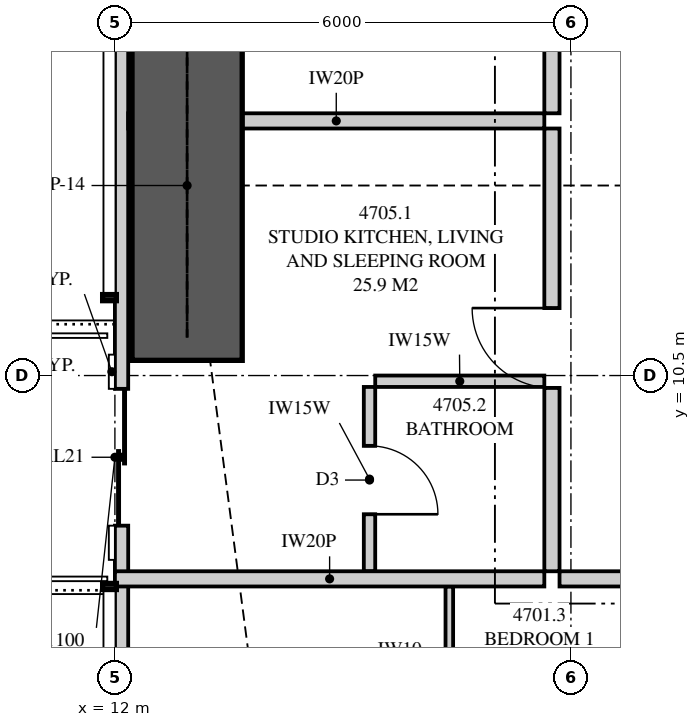
"""IFC4 building model, lengths in metres.
Left out: names, types, materials, properties, quantities, classifications, styles, units other than length and angle.
Written with IfcOpenShell. Run it as: python <this file> out.ifc"""

import sys

from ifc_helpers import new_model, si_unit, direction, frame, frame_2d, origin, place, context, subcontext, project, spatial, polyline, rectangle, outline, extrude, element, fill, save


model = new_model("IFC4")
c1 = context("Model", 3, precision=1e-05, world=origin(), true_north=direction((0.0, 1.0)))
c2 = subcontext(c1, "Body", "Model", "MODEL_VIEW")
j1 = project(units=[si_unit("LENGTHUNIT", "METRE"), si_unit("PLANEANGLEUNIT", "RADIAN")], contexts=[c1])
p1 = place(None, origin())
s1 = spatial("IfcSite", under=j1, at=p1, CompositionType="ELEMENT")
p2 = place(p1, origin())
s2 = spatial("IfcBuilding", under=s1, at=p2, CompositionType="ELEMENT")
p3 = place(p2, frame((0.0, 0.0, 174.45)))
s3 = spatial("IfcBuildingStorey", under=s2, at=p3, CompositionType="ELEMENT", Elevation=174.45)
p4 = place(p3, frame((12.087, 32.949, 0.0), z_axis=(0.0, 0.0, 1.0), x_axis=(0.0, -1.0, 0.0)))
e1 = element("IfcWall", 1, at=p4, inside=s3, PredefinedType="SOLIDWALL", context=c2, shape_type="SweptSolid", body=[
    extrude(outline(polyline([(0.0, 0.0), (29.897, 0.0), (29.897, 3.11), (20.191, 3.11), (20.191, 2.15), (20.051, 2.15), (20.051, 3.11), (19.949, 3.11), (19.949, 2.15), (7.949, 2.15), (7.949, 3.11), (7.823, 3.11), (7.823, 2.15), (7.73, 2.15), (7.73, 3.11), (0.0, 3.11), (0.0, 0.0)])), frame((0.0, 0.087, 0.0), z_axis=(0.0, -1.0, 0.0), x_axis=(1.0, 0.0, 0.0)), (0.0, 0.0, 1.0), 0.175),
])
p5 = place(p4, frame((1.237, 0.0, 0.4)))
e2 = element("IfcOpeningElement", 2, at=p5, cuts=e1, PredefinedType="OPENING", context=c2, shape_type="SweptSolid", body=[
    extrude(rectangle(XDim=1.2, YDim=1.7, at=frame_2d((0.6, 0.85))), frame((0.0, 0.097, 0.0), z_axis=(0.0, -1.0, 0.0), x_axis=(1.0, 0.0, 0.0)), (0.0, 0.0, 1.0), 0.195),
])
p6 = place(p4, frame((10.482, 0.0, 0.4)))
e3 = element("IfcOpeningElement", 3, at=p6, cuts=e1, PredefinedType="OPENING", context=c2, shape_type="SweptSolid", body=[
    extrude(rectangle(XDim=2.4, YDim=1.7, at=frame_2d((1.2, 0.85))), frame((0.0, 0.097, 0.0), z_axis=(0.0, -1.0, 0.0), x_axis=(1.0, 0.0, 0.0)), (0.0, 0.0, 1.0), 0.195),
])
p7 = place(p4, frame((15.735, 0.0, 0.4)))
e4 = element("IfcOpeningElement", 4, at=p7, cuts=e1, PredefinedType="OPENING", context=c2, shape_type="SweptSolid", body=[
    extrude(rectangle(XDim=1.8, YDim=1.7, at=frame_2d((0.9, 0.85))), frame((0.0, 0.097, 0.0), z_axis=(0.0, -1.0, 0.0), x_axis=(1.0, 0.0, 0.0)), (0.0, 0.0, 1.0), 0.195),
])
p8 = place(p4, frame((22.624, 0.0, 0.0)))
e5 = element("IfcOpeningElement", 5, at=p8, cuts=e1, PredefinedType="OPENING", context=c2, shape_type="SweptSolid", body=[
    extrude(rectangle(XDim=1.8, YDim=2.1, at=frame_2d((0.9, 1.05))), frame((0.0, 0.097, 0.0), z_axis=(0.0, -1.0, 0.0), x_axis=(1.0, 0.0, 0.0)), (0.0, 0.0, 1.0), 0.195),
])
p9 = place(p4, frame((26.301, 0.0, 0.4)))
e6 = element("IfcOpeningElement", 6, at=p9, cuts=e1, PredefinedType="OPENING", context=c2, shape_type="SweptSolid", body=[
    extrude(rectangle(XDim=1.8, YDim=1.7, at=frame_2d((0.9, 0.85))), frame((0.0, 0.097, 0.0), z_axis=(0.0, -1.0, 0.0), x_axis=(1.0, 0.0, 0.0)), (0.0, 0.0, 1.0), 0.195),
])
p10 = place(p3, frame((17.85, 7.825, 0.0), z_axis=(0.0, 0.0, 1.0), x_axis=(1.0, 0.0, 0.0)))
e7 = element("IfcWall", 7, at=p10, inside=s3, PredefinedType="PARTITIONING", context=c2, shape_type="SweptSolid", body=[
    extrude(outline(polyline([(0.0, 0.0), (5.9, 0.0), (5.9, 3.11), (4.737, 3.11), (4.737, 2.541), (4.062, 2.541), (4.062, 3.11), (0.0, 3.11), (0.0, 0.0)])), frame((0.0, 0.1, 0.0), z_axis=(0.0, -1.0, 0.0), x_axis=(1.0, 0.0, 0.0)), (0.0, 0.0, 1.0), 0.2),
])
p11 = place(p10, frame((2.5, 0.0, 0.0)))
e8 = element("IfcOpeningElement", 8, at=p11, cuts=e7, PredefinedType="OPENING", context=c2, shape_type="SweptSolid", body=[
    extrude(rectangle(XDim=1.05, YDim=2.2, at=frame_2d((0.525, 1.1))), frame((0.0, 0.11, 0.0), z_axis=(0.0, -1.0, 0.0), x_axis=(1.0, 0.0, 0.0)), (0.0, 0.0, 1.0), 0.22),
])
p12 = place(p3, frame((16.4, 3.796, 0.0), z_axis=(0.0, 0.0, 1.0), x_axis=(0.0, 1.0, 0.0)))
e9 = element("IfcWall", 9, at=p12, inside=s3, PredefinedType="PARTITIONING", context=c2, shape_type="SweptSolid", body=[
    extrude(rectangle(XDim=3.929, YDim=0.1, at=frame_2d((1.964, 0.0))), origin(), (0.0, 0.0, 1.0), 3.11),
])
p13 = place(p12, frame((1.477, 0.0, 0.0)))
e10 = element("IfcOpeningElement", 10, at=p13, cuts=e9, PredefinedType="OPENING", context=c2, shape_type="SweptSolid", body=[
    extrude(rectangle(XDim=0.9, YDim=2.1, at=frame_2d((0.45, 1.05))), frame((0.0, 0.06, 0.0), z_axis=(0.0, -1.0, 0.0), x_axis=(1.0, 0.0, 0.0)), (0.0, 0.0, 1.0), 0.12),
])
p14 = place(p3, frame((12.0, 7.825, 0.0), z_axis=(0.0, 0.0, 1.0), x_axis=(1.0, 0.0, 0.0)))
e11 = element("IfcWall", 11, at=p14, inside=s3, PredefinedType="PARTITIONING", context=c2, shape_type="SweptSolid", body=[
    extrude(outline(polyline([(0.0, 0.0), (5.65, 0.0), (5.65, 3.11), (2.547, 3.11), (2.547, 2.15), (0.712, 2.15), (0.712, 3.11), (0.0, 3.11), (0.0, 0.0)])), frame((0.0, 0.1, 0.0), z_axis=(0.0, -1.0, 0.0), x_axis=(1.0, 0.0, 0.0)), (0.0, 0.0, 1.0), 0.2),
])
p15 = place(p3, frame((12.175, 13.85, 0.0), z_axis=(0.0, 0.0, 1.0), x_axis=(1.0, 0.0, 0.0)))
e12 = element("IfcWall", 12, at=p15, inside=s3, PredefinedType="PARTITIONING", context=c2, shape_type="SweptSolid", body=[
    extrude(outline(polyline([(0.529, 2.15), (0.0, 2.15), (0.0, 0.0), (0.529, 0.0), (0.529, 0.835), (1.021, 0.835), (1.021, 0.0), (5.475, 0.0), (5.475, 3.11), (1.685, 3.11), (1.685, 2.15), (1.021, 2.15), (1.021, 1.315), (0.529, 1.315), (0.529, 2.15)])), frame((0.0, 0.1, 0.0), z_axis=(0.0, -1.0, 0.0), x_axis=(1.0, 0.0, 0.0)), (0.0, 0.0, 1.0), 0.2),
])
p16 = place(p3, frame((17.75, 7.925, 0.0), z_axis=(0.0, 0.0, 1.0), x_axis=(0.0, 1.0, 0.0)))
e13 = element("IfcWall", 13, at=p16, inside=s3, PredefinedType="PARTITIONING", context=c2, shape_type="SweptSolid", body=[
    extrude(outline(polyline([(0.0, 0.0), (5.825, 0.0), (5.825, 3.11), (5.412, 3.11), (5.412, 2.541), (4.738, 2.541), (4.738, 3.11), (0.0, 3.11), (0.0, 0.0)])), frame((0.0, 0.1, 0.0), z_axis=(0.0, -1.0, 0.0), x_axis=(1.0, 0.0, 0.0)), (0.0, 0.0, 1.0), 0.2),
])
p17 = place(p16, frame((2.413, 0.0, 0.0)))
e14 = element("IfcOpeningElement", 14, at=p17, cuts=e13, PredefinedType="OPENING", context=c2, shape_type="SweptSolid", body=[
    extrude(rectangle(XDim=1.05, YDim=2.2, at=frame_2d((0.525, 1.1))), frame((0.0, 0.11, 0.0), z_axis=(0.0, -1.0, 0.0), x_axis=(1.0, 0.0, 0.0)), (0.0, 0.0, 1.0), 0.22),
])
p18 = place(p3, frame((15.35, 7.925, 0.0), z_axis=(0.0, 0.0, 1.0), x_axis=(0.0, 1.0, 0.0)))
e15 = element("IfcWall", 15, at=p18, inside=s3, PredefinedType="PLUMBINGWALL", context=c2, shape_type="SweptSolid", body=[
    extrude(rectangle(XDim=2.425, YDim=0.15, at=frame_2d((1.212, 0.0))), origin(), (0.0, 0.0, 1.0), 3.11),
])
p19 = place(p18, frame((0.75, 0.0, 0.0)))
e16 = element("IfcOpeningElement", 16, at=p19, cuts=e15, PredefinedType="OPENING", context=c2, shape_type="SweptSolid", body=[
    extrude(rectangle(XDim=0.9, YDim=2.1, at=frame_2d((0.45, 1.05))), frame((0.0, 0.085, 0.0), z_axis=(0.0, -1.0, 0.0), x_axis=(1.0, 0.0, 0.0)), (0.0, 0.0, 1.0), 0.17),
])
p20 = place(p3, frame((15.425, 10.425, 0.0), z_axis=(0.0, 0.0, 1.0), x_axis=(1.0, 0.0, 0.0)))
e17 = element("IfcWall", 17, at=p20, inside=s3, PredefinedType="PLUMBINGWALL", context=c2, shape_type="SweptSolid", body=[
    extrude(rectangle(XDim=2.225, YDim=0.15, at=frame_2d((1.112, 0.0))), origin(), (0.0, 0.0, 1.0), 3.11),
])
p21 = place(p3, frame((17.75, 13.95, 0.0), z_axis=(0.0, 0.0, 1.0), x_axis=(0.0, 1.0, 0.0)))
e18 = element("IfcWall", 18, at=p21, inside=s3, PredefinedType="PARTITIONING", context=c2, shape_type="SweptSolid", body=[
    extrude(outline(polyline([(0.0, 0.0), (15.125, 0.0), (15.125, 3.11), (11.387, 3.11), (11.387, 2.541), (10.713, 2.541), (10.713, 3.11), (0.0, 3.11), (0.0, 0.0)])), frame((0.0, 0.1, 0.0), z_axis=(0.0, -1.0, 0.0), x_axis=(1.0, 0.0, 0.0)), (0.0, 0.0, 1.0), 0.2),
])
p22 = place(p21, frame((7.062, 0.0, 0.0)))
e19 = element("IfcOpeningElement", 19, at=p22, cuts=e18, PredefinedType="OPENING", context=c2, shape_type="SweptSolid", body=[
    extrude(rectangle(XDim=1.05, YDim=2.2, at=frame_2d((0.525, 1.1))), frame((0.0, 0.11, 0.0), z_axis=(0.0, -1.0, 0.0), x_axis=(1.0, 0.0, 0.0)), (0.0, 0.0, 1.0), 0.22),
])
p23 = place(p3, frame((12.95, 10.7, 0.0), z_axis=(0.0, 0.0, 1.0), x_axis=(0.0, 1.0, 0.0)))
e20 = element("IfcWall", 20, at=p23, inside=s3, PredefinedType="SHEAR", context=c2, shape_type="SweptSolid", body=[
    extrude(rectangle(XDim=4.6, YDim=1.45, at=frame_2d((2.3, 0.0))), origin(), (0.0, 0.0, 1.0), 3.35),
])
p24 = place(p8, origin())
e21 = element("IfcDoor", 21, at=p24, inside=s3, OperationType="SLIDING_TO_LEFT", PredefinedType="DOOR", context=c2, shape_type="SweptSolid", body=[
    extrude(rectangle(XDim=1.8, YDim=2.1, at=frame_2d((0.9, 1.05))), frame((0.0, 0.025, 0.0), z_axis=(0.0, -1.0, 0.0), x_axis=(1.0, 0.0, 0.0)), (0.0, 0.0, 1.0), 0.05),
])
fill(e5, e21)
p25 = place(p17, origin())
e22 = element("IfcDoor", 22, at=p25, inside=s3, OperationType="SINGLE_SWING_RIGHT", PredefinedType="DOOR", context=c2, shape_type="SweptSolid", body=[
    extrude(rectangle(XDim=1.05, YDim=2.2, at=frame_2d((0.525, 1.1))), frame((0.0, 0.025, 0.0), z_axis=(0.0, -1.0, 0.0), x_axis=(1.0, 0.0, 0.0)), (0.0, 0.0, 1.0), 0.05),
])
fill(e14, e22)
p26 = place(p19, frame((0.9, 0.0, 0.0), z_axis=(0.0, 0.0, 1.0), x_axis=(-1.0, 0.0, 0.0)))
e23 = element("IfcDoor", 23, at=p26, inside=s3, OperationType="SINGLE_SWING_RIGHT", PredefinedType="DOOR", context=c2, shape_type="SweptSolid", body=[
    extrude(rectangle(XDim=0.9, YDim=2.1, at=frame_2d((0.45, 1.05))), frame((0.0, 0.025, 0.0), z_axis=(0.0, -1.0, 0.0), x_axis=(1.0, 0.0, 0.0)), (0.0, 0.0, 1.0), 0.05),
])
fill(e16, e23)
save(model, sys.argv[1])
